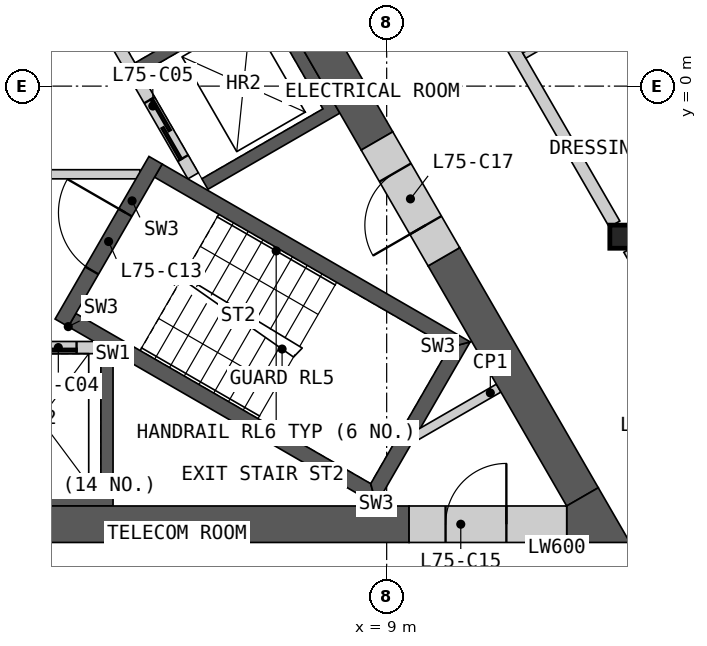
"""IFC4 building model, lengths in metres.
Left out: names, types, materials, properties, quantities, classifications, styles, units other than length and angle.
Written with IfcOpenShell. Run it as: python <this file> out.ifc"""

import sys

from ifc_helpers import new_model, si_unit, direction, frame, frame_2d, origin, origin_2d, place, context, subcontext, project, spatial, polyline, rectangle, i_section, outline, extrude, element, fill, save


model = new_model("IFC4")
c1 = context("Model", 3, precision=1e-05, world=origin(), true_north=direction((0.0, 1.0)))
c2 = subcontext(c1, "Body", "Model", "MODEL_VIEW")
j1 = project(units=[si_unit("LENGTHUNIT", "METRE"), si_unit("PLANEANGLEUNIT", "RADIAN")], contexts=[c1])
p1 = place(None, origin())
s1 = spatial("IfcSite", under=j1, at=p1, CompositionType="ELEMENT")
p2 = place(p1, origin())
s2 = spatial("IfcBuilding", under=s1, at=p2, CompositionType="ELEMENT")
p3 = place(p2, frame((0.0, 0.0, 335.8)))
s3 = spatial("IfcBuildingStorey", under=s2, at=p3, CompositionType="ELEMENT", Elevation=335.8)
p4 = place(p3, frame((12.868, -2.476, 0.0), z_axis=(0.0, 0.0, 1.0), x_axis=(1.0, 0.0, 0.0)))
e1 = element("IfcColumn", 1, at=p4, inside=s3, PredefinedType="COLUMN", context=c2, shape_type="SweptSolid", body=[
    extrude(i_section(OverallWidth=0.396, OverallDepth=0.381, WebThickness=0.019, FlangeThickness=0.03, at=origin_2d()), origin(), (0.0, 0.0, 1.0), 3.4),
])
p5 = place(p3, origin())
e2 = element("IfcWall", 2, at=p5, inside=s3, PredefinedType="SHEAR", context=c2, shape_type="SweptSolid", body=[
    extrude(outline(polyline([(4.5, -4.4), (4.5, -6.906), (-4.5, -6.906), (-4.5, -4.4), (-4.3, -4.4), (-4.3, -6.7), (-2.3, -6.7), (-2.3, -4.4), (-2.1, -4.4), (-2.1, -6.7), (-0.1, -6.7), (-0.1, -4.4), (0.1, -4.4), (0.1, -6.7), (2.1, -6.7), (2.1, -4.4), (2.3, -4.4), (2.3, -6.7), (4.3, -6.7), (4.3, -4.4), (4.5, -4.4)])), origin(), (0.0, 0.0, 1.0), 3.1),
])
p6 = place(p3, frame((-4.187, -4.3, 0.0), z_axis=(0.0, 0.0, 1.0), x_axis=(1.0, 0.0, 0.0)))
e3 = element("IfcWall", 3, at=p6, inside=s3, PredefinedType="SOLIDWALL", context=c2, shape_type="SweptSolid", body=[
    extrude(rectangle(XDim=8.373, YDim=0.2, at=frame_2d((4.187, 0.0))), origin(), (0.0, 0.0, 1.0), 3.1),
])
p7 = place(p6, frame((0.287, 0.0, 0.0)))
e4 = element("IfcOpeningElement", 4, at=p7, cuts=e3, PredefinedType="OPENING", context=c2, shape_type="SweptSolid", body=[
    extrude(rectangle(XDim=1.2, YDim=2.1, at=frame_2d((0.6, 1.05))), frame((0.0, 0.11, 0.0), z_axis=(0.0, -1.0, 0.0), x_axis=(1.0, 0.0, 0.0)), (0.0, 0.0, 1.0), 0.22),
])
p8 = place(p6, frame((2.387, 0.0, 0.0)))
e5 = element("IfcOpeningElement", 5, at=p8, cuts=e3, PredefinedType="OPENING", context=c2, shape_type="SweptSolid", body=[
    extrude(rectangle(XDim=1.4, YDim=2.1, at=frame_2d((0.7, 1.05))), frame((0.0, 0.11, 0.0), z_axis=(0.0, -1.0, 0.0), x_axis=(1.0, 0.0, 0.0)), (0.0, 0.0, 1.0), 0.22),
])
p9 = place(p6, frame((4.737, 0.0, 0.0)))
e6 = element("IfcOpeningElement", 6, at=p9, cuts=e3, PredefinedType="OPENING", context=c2, shape_type="SweptSolid", body=[
    extrude(rectangle(XDim=1.1, YDim=2.1, at=frame_2d((0.55, 1.05))), frame((0.0, 0.11, 0.0), z_axis=(0.0, -1.0, 0.0), x_axis=(1.0, 0.0, 0.0)), (0.0, 0.0, 1.0), 0.22),
])
p10 = place(p6, frame((6.887, 0.0, 0.0)))
e7 = element("IfcOpeningElement", 7, at=p10, cuts=e3, PredefinedType="OPENING", context=c2, shape_type="SweptSolid", body=[
    extrude(rectangle(XDim=1.2, YDim=2.1, at=frame_2d((0.6, 1.05))), frame((0.0, 0.11, 0.0), z_axis=(0.0, -1.0, 0.0), x_axis=(1.0, 0.0, 0.0)), (0.0, 0.0, 1.0), 0.22),
])
p11 = place(p3, origin())
e8 = element("IfcWall", 8, at=p11, inside=s3, PredefinedType="SHEAR", context=c2, shape_type="SweptSolid", body=[
    extrude(outline(polyline([(1.561, 6.097), (3.731, 7.35), (8.231, -0.444), (6.061, -1.697), (5.96, -1.524), (7.952, -0.374), (6.952, 1.358), (4.96, 0.208), (4.861, 0.381), (6.852, 1.531), (5.852, 3.263), (3.861, 2.113), (3.76, 2.287), (5.752, 3.437), (4.752, 5.169), (2.76, 4.019), (2.66, 4.192), (4.652, 5.342), (3.652, 7.074), (1.66, 5.924), (1.561, 6.097)])), origin(), (0.0, 0.0, 1.0), 3.1),
])
p12 = place(p3, frame((5.817, -1.476, 0.0), z_axis=(0.0, 0.0, 1.0), x_axis=(-0.500002616675, 0.866023893041, 0.0)))
e9 = element("IfcWall", 9, at=p12, inside=s3, PredefinedType="SOLIDWALL", context=c2, shape_type="SweptSolid", body=[
    extrude(rectangle(XDim=8.373, YDim=0.2, at=frame_2d((4.187, 0.0))), origin(), (0.0, 0.0, 1.0), 3.1),
])
p13 = place(p12, frame((0.337, 0.0, 0.0)))
e10 = element("IfcOpeningElement", 10, at=p13, cuts=e9, PredefinedType="OPENING", context=c2, shape_type="SweptSolid", body=[
    extrude(rectangle(XDim=1.1, YDim=2.1, at=frame_2d((0.55, 1.05))), frame((0.0, 0.11, 0.0), z_axis=(0.0, -1.0, 0.0), x_axis=(1.0, 0.0, 0.0)), (0.0, 0.0, 1.0), 0.22),
])
p14 = place(p12, frame((2.537, 0.0, 0.0)))
e11 = element("IfcOpeningElement", 11, at=p14, cuts=e9, PredefinedType="OPENING", context=c2, shape_type="SweptSolid", body=[
    extrude(rectangle(XDim=1.1, YDim=2.1, at=frame_2d((0.55, 1.05))), frame((0.0, 0.11, 0.0), z_axis=(0.0, -1.0, 0.0), x_axis=(1.0, 0.0, 0.0)), (0.0, 0.0, 1.0), 0.22),
])
p15 = place(p12, frame((4.737, 0.0, 0.0)))
e12 = element("IfcOpeningElement", 12, at=p15, cuts=e9, PredefinedType="OPENING", context=c2, shape_type="SweptSolid", body=[
    extrude(rectangle(XDim=1.1, YDim=2.1, at=frame_2d((0.55, 1.05))), frame((0.0, 0.11, 0.0), z_axis=(0.0, -1.0, 0.0), x_axis=(1.0, 0.0, 0.0)), (0.0, 0.0, 1.0), 0.22),
])
p16 = place(p12, frame((7.037, 0.0, 0.0)))
e13 = element("IfcOpeningElement", 13, at=p16, cuts=e9, PredefinedType="OPENING", context=c2, shape_type="SweptSolid", body=[
    extrude(rectangle(XDim=0.9, YDim=2.1, at=frame_2d((0.45, 1.05))), frame((0.0, 0.11, 0.0), z_axis=(0.0, -1.0, 0.0), x_axis=(1.0, 0.0, 0.0)), (0.0, 0.0, 1.0), 0.22),
])
p17 = place(p3, frame((-4.941, -1.45, 0.0), z_axis=(0.0, 0.0, 1.0), x_axis=(1.0, 0.0, 0.0)))
e14 = element("IfcWall", 14, at=p17, inside=s3, PredefinedType="PARTITIONING", context=c2, shape_type="SweptSolid", body=[
    extrude(rectangle(XDim=9.882, YDim=0.15, at=frame_2d((4.941, 0.0))), origin(), (0.0, 0.0, 1.0), 3.1),
])
p18 = place(p17, frame((4.391, 0.0, 0.0)))
e15 = element("IfcOpeningElement", 15, at=p18, cuts=e14, PredefinedType="OPENING", context=c2, shape_type="SweptSolid", body=[
    extrude(rectangle(XDim=1.1, YDim=2.1, at=frame_2d((0.55, 1.05))), frame((0.0, 0.085, 0.0), z_axis=(0.0, -1.0, 0.0), x_axis=(1.0, 0.0, 0.0)), (0.0, 0.0, 1.0), 0.17),
])
p19 = place(p3, origin())
e16 = element("IfcWall", 16, at=p19, inside=s3, PredefinedType="SHEAR", context=c2, shape_type="SweptSolid", body=[
    extrude(outline(polyline([(3.763, -3.956), (8.83, -6.881), (8.738, -6.539), (3.888, -3.739), (3.763, -3.956)])), origin(), (0.0, 0.0, 1.0), 3.1),
])
p20 = place(p3, origin())
e17 = element("IfcWall", 17, at=p20, inside=s3, PredefinedType="SHEAR", context=c2, shape_type="SweptSolid", body=[
    extrude(outline(polyline([(8.83, -6.881), (10.374, -4.206), (10.032, -4.298), (8.738, -6.539), (8.83, -6.881)])), origin(), (0.0, 0.0, 1.0), 3.1),
])
p21 = place(p3, origin())
e18 = element("IfcWall", 18, at=p21, inside=s3, PredefinedType="SHEAR", context=c2, shape_type="SweptSolid", body=[
    extrude(outline(polyline([(10.032, -4.298), (10.374, -4.206), (5.307, -1.281), (5.182, -1.498), (10.032, -4.298)])), origin(), (0.0, 0.0, 1.0), 3.1),
])
p22 = place(p3, frame((3.655, -3.893, 0.0), z_axis=(0.0, 0.0, 1.0), x_axis=(0.499982516597, 0.866035497597, 0.0)))
e19 = element("IfcWall", 19, at=p22, inside=s3, PredefinedType="SHEAR", context=c2, shape_type="SweptSolid", body=[
    extrude(rectangle(XDim=3.088, YDim=0.25, at=frame_2d((1.544, 0.0))), origin(), (0.0, 0.0, 1.0), 3.1),
])
p23 = place(p22, frame((0.994, 0.0, 0.0)))
e20 = element("IfcOpeningElement", 20, at=p23, cuts=e19, PredefinedType="OPENING", context=c2, shape_type="SweptSolid", body=[
    extrude(rectangle(XDim=1.1, YDim=2.1, at=frame_2d((0.55, 1.05))), frame((0.0, 0.135, 0.0), z_axis=(0.0, -1.0, 0.0), x_axis=(1.0, 0.0, 0.0)), (0.0, 0.0, 1.0), 0.27),
])
p24 = place(p3, frame((10.842, -4.967, 0.0), z_axis=(0.0, 0.0, 1.0), x_axis=(-0.866098216386, -0.499873863663, 0.0)))
e21 = element("IfcWall", 21, at=p24, inside=s3, PredefinedType="PARTITIONING", context=c2, shape_type="SweptSolid", body=[
    extrude(rectangle(XDim=1.582, YDim=0.15, at=frame_2d((0.791, 0.0))), origin(), (0.0, 0.0, 1.0), 3.1),
])
p25 = place(p3, frame((-4.892, -7.206, 0.0), z_axis=(0.0, 0.0, 1.0), x_axis=(1.0, 0.0, 0.0)))
e22 = element("IfcWall", 22, at=p25, inside=s3, PredefinedType="SHEAR", context=c2, shape_type="SweptSolid", body=[
    extrude(rectangle(XDim=14.261, YDim=0.6, at=frame_2d((7.13, 0.0))), origin(), (0.0, 0.0, 1.0), 3.1),
])
p26 = place(p3, frame((8.841, -0.902, 0.0), z_axis=(0.0, 0.0, 1.0), x_axis=(-0.499995618375, 0.866027933502, 0.0)))
e23 = element("IfcWall", 23, at=p26, inside=s3, PredefinedType="SHEAR", context=c2, shape_type="SweptSolid", body=[
    extrude(rectangle(XDim=14.571, YDim=0.6, at=frame_2d((7.285, 0.0))), origin(), (0.0, 0.0, 1.0), 3.1),
])
p27 = place(p3, frame((12.221, -6.756, 0.0), z_axis=(0.0, 0.0, 1.0), x_axis=(-0.500020646047, 0.866013483456, 0.0)))
e24 = element("IfcWall", 24, at=p27, inside=s3, PredefinedType="SHEAR", context=c2, shape_type="SweptSolid", body=[
    extrude(rectangle(XDim=4.559, YDim=0.6, at=frame_2d((2.28, 0.0))), origin(), (0.0, 0.0, 1.0), 3.1),
])
p28 = place(p3, origin())
e25 = element("IfcWall", 25, at=p28, inside=s3, PredefinedType="SHEAR", context=c2, shape_type="SweptSolid", body=[
    extrude(outline(polyline([(11.961, -7.506), (11.961, -6.906), (12.48, -6.606), (13.0, -7.506), (11.961, -7.506)])), origin(), (0.0, 0.0, 1.0), 3.1),
])
p29 = place(p3, frame((9.369, -7.206, 0.0), z_axis=(0.0, 0.0, 1.0), x_axis=(1.0, 0.0, 0.0)))
e26 = element("IfcWall", 26, at=p29, inside=s3, PredefinedType="SHEAR", context=c2, shape_type="SweptSolid", body=[
    extrude(rectangle(XDim=2.592, YDim=0.6, at=frame_2d((1.296, 0.0))), origin(), (0.0, 0.0, 1.0), 3.1),
])
p30 = place(p29, frame((0.6, 0.0, 0.0)))
e27 = element("IfcOpeningElement", 27, at=p30, cuts=e26, PredefinedType="OPENING", context=c2, shape_type="SweptSolid", body=[
    extrude(rectangle(XDim=1.0, YDim=2.1, at=frame_2d((0.5, 1.05))), frame((0.0, 0.31, 0.0), z_axis=(0.0, -1.0, 0.0), x_axis=(1.0, 0.0, 0.0)), (0.0, 0.0, 1.0), 0.62),
])
p31 = place(p3, frame((9.941, -2.807, 0.0), z_axis=(0.0, 0.0, 1.0), x_axis=(-0.499994660107, 0.866028486751, 0.0)))
e28 = element("IfcWall", 28, at=p31, inside=s3, PredefinedType="SHEAR", context=c2, shape_type="SweptSolid", body=[
    extrude(rectangle(XDim=2.2, YDim=0.6, at=frame_2d((1.1, 0.0))), origin(), (0.0, 0.0, 1.0), 3.1),
])
p32 = place(p31, frame((0.6, 0.0, 0.0)))
e29 = element("IfcOpeningElement", 29, at=p32, cuts=e28, PredefinedType="OPENING", context=c2, shape_type="SweptSolid", body=[
    extrude(rectangle(XDim=1.0, YDim=2.1, at=frame_2d((0.5, 1.05))), frame((0.0, 0.31, 0.0), z_axis=(0.0, -1.0, 0.0), x_axis=(1.0, 0.0, 0.0)), (0.0, 0.0, 1.0), 0.62),
])
p33 = place(p3, frame((8.698, 4.745, 0.0), z_axis=(0.0, 0.0, 1.0), x_axis=(0.499984266882, -0.866034487114, 0.0)))
e30 = element("IfcWall", 30, at=p33, inside=s3, PredefinedType="PARTITIONING", context=c2, shape_type="SweptSolid", body=[
    extrude(rectangle(XDim=8.099, YDim=0.2, at=frame_2d((4.049, 0.0))), origin(), (0.0, 0.0, 1.0), 3.1),
])
p34 = place(p33, frame((1.164, 0.0, 0.0)))
e31 = element("IfcOpeningElement", 31, at=p34, cuts=e30, PredefinedType="OPENING", context=c2, shape_type="SweptSolid", body=[
    extrude(rectangle(XDim=1.0, YDim=2.1, at=frame_2d((0.5, 1.05))), frame((0.0, 0.11, 0.0), z_axis=(0.0, -1.0, 0.0), x_axis=(1.0, 0.0, 0.0)), (0.0, 0.0, 1.0), 0.22),
])
p35 = place(p3, frame((12.988, -2.684, 0.0), z_axis=(0.0, 0.0, 1.0), x_axis=(0.500003406062, -0.866023437285, 0.0)))
e32 = element("IfcWall", 32, at=p35, inside=s3, PredefinedType="PARTITIONING", context=c2, shape_type="SweptSolid", body=[
    extrude(rectangle(XDim=4.288, YDim=0.2, at=frame_2d((2.144, 0.0))), origin(), (0.0, 0.0, 1.0), 3.1),
])
p36 = place(p35, frame((2.521, 0.0, 0.0)))
e33 = element("IfcOpeningElement", 33, at=p36, cuts=e32, PredefinedType="OPENING", context=c2, shape_type="SweptSolid", body=[
    extrude(rectangle(XDim=1.0, YDim=2.1, at=frame_2d((0.5, 1.05))), frame((0.0, 0.11, 0.0), z_axis=(0.0, -1.0, 0.0), x_axis=(1.0, 0.0, 0.0)), (0.0, 0.0, 1.0), 0.22),
])
p37 = place(p3, frame((11.263, 0.503, 0.0), z_axis=(0.0, 0.0, 1.0), x_axis=(0.866023773276, 0.500002824113, 0.0)))
e34 = element("IfcWall", 34, at=p37, inside=s3, PredefinedType="PARTITIONING", context=c2, shape_type="SweptSolid", body=[
    extrude(rectangle(XDim=7.965, YDim=0.1, at=frame_2d((3.982, 0.0))), origin(), (0.0, 0.0, 1.0), 2.33),
])
p38 = place(p37, frame((5.061, 0.0, 0.0)))
e35 = element("IfcOpeningElement", 35, at=p38, cuts=e34, PredefinedType="OPENING", context=c2, shape_type="SweptSolid", body=[
    extrude(rectangle(XDim=0.95, YDim=2.1, at=frame_2d((0.475, 1.05))), frame((0.0, 0.06, 0.0), z_axis=(0.0, -1.0, 0.0), x_axis=(1.0, 0.0, 0.0)), (0.0, 0.0, 1.0), 0.12),
])
p39 = place(p10, origin())
e36 = element("IfcDoor", 36, at=p39, inside=s3, OperationType="SLIDING_TO_LEFT", PredefinedType="DOOR", context=c2, shape_type="SweptSolid", body=[
    extrude(rectangle(XDim=1.2, YDim=2.1, at=frame_2d((0.6, 1.05))), frame((0.0, 0.025, 0.0), z_axis=(0.0, -1.0, 0.0), x_axis=(1.0, 0.0, 0.0)), (0.0, 0.0, 1.0), 0.05),
])
fill(e7, e36)
p40 = place(p13, origin())
e37 = element("IfcDoor", 37, at=p40, inside=s3, OperationType="SLIDING_TO_LEFT", PredefinedType="DOOR", context=c2, shape_type="SweptSolid", body=[
    extrude(rectangle(XDim=1.1, YDim=2.1, at=frame_2d((0.55, 1.05))), frame((0.0, 0.025, 0.0), z_axis=(0.0, -1.0, 0.0), x_axis=(1.0, 0.0, 0.0)), (0.0, 0.0, 1.0), 0.05),
])
fill(e10, e37)
p41 = place(p23, origin())
e38 = element("IfcDoor", 38, at=p41, inside=s3, OperationType="SINGLE_SWING_RIGHT", PredefinedType="DOOR", context=c2, shape_type="SweptSolid", body=[
    extrude(rectangle(XDim=1.1, YDim=2.1, at=frame_2d((0.55, 1.05))), frame((0.0, 0.025, 0.0), z_axis=(0.0, -1.0, 0.0), x_axis=(1.0, 0.0, 0.0)), (0.0, 0.0, 1.0), 0.05),
])
fill(e20, e38)
p42 = place(p30, origin())
e39 = element("IfcDoor", 39, at=p42, inside=s3, OperationType="SINGLE_SWING_RIGHT", PredefinedType="DOOR", context=c2, shape_type="SweptSolid", body=[
    extrude(rectangle(XDim=1.0, YDim=2.1, at=frame_2d((0.5, 1.05))), frame((0.0, 0.055, 0.0), z_axis=(0.0, -1.0, 0.0), x_axis=(1.0, 0.0, 0.0)), (0.0, 0.0, 1.0), 0.05),
])
fill(e27, e39)
p43 = place(p32, origin())
e40 = element("IfcDoor", 40, at=p43, inside=s3, OperationType="SINGLE_SWING_LEFT", PredefinedType="DOOR", context=c2, shape_type="SweptSolid", body=[
    extrude(rectangle(XDim=1.0, YDim=2.1, at=frame_2d((0.5, 1.05))), frame((0.0, 0.055, 0.0), z_axis=(0.0, -1.0, 0.0), x_axis=(1.0, 0.0, 0.0)), (0.0, 0.0, 1.0), 0.05),
])
fill(e29, e40)
save(model, sys.argv[1])
